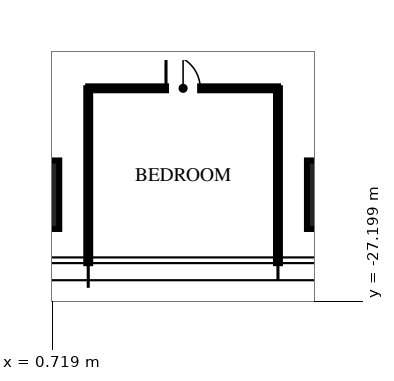
"""IFC4 building model, lengths in metres.
Left out: names, types, materials, properties, quantities, classifications, styles, units other than length and angle.
Written with IfcOpenShell. Run it as: python <this file> out.ifc"""

import sys

from ifc_helpers import new_model, si_unit, direction, frame, frame_2d, origin, origin_2d, place, context, subcontext, project, spatial, rectangle, extrude, element, fill, save


model = new_model("IFC4")
c1 = context("Model", 3, precision=1e-05, world=origin(), true_north=direction((0.0, 1.0)))
c2 = subcontext(c1, "Body", "Model", "MODEL_VIEW")
j1 = project(units=[si_unit("LENGTHUNIT", "METRE"), si_unit("PLANEANGLEUNIT", "RADIAN")], contexts=[c1])
p1 = place(None, origin())
s1 = spatial("IfcSite", under=j1, at=p1, CompositionType="ELEMENT")
p2 = place(p1, origin())
s2 = spatial("IfcBuilding", under=s1, at=p2, CompositionType="ELEMENT")
p3 = place(p2, frame((0.0, 0.0, 218.25)))
s3 = spatial("IfcBuildingStorey", under=s2, at=p3, CompositionType="ELEMENT", Elevation=218.25)
for number, where, z_axis, x_axis in (
    (1, (8.32, -24.4, 0.0), (0.0, 0.0, 1.0), (1.0, 0.0, 0.0)),
    (2, (0.0, -24.4, 0.0), (0.0, 0.0, 1.0), (1.0, 0.0, 0.0)),
):
    element("IfcColumn", number, at=place(p3, frame(where, z_axis=z_axis, x_axis=x_axis)), inside=s3, PredefinedType="COLUMN", context=c2, shape_type="SweptSolid", body=[
        extrude(rectangle(XDim=1.8, YDim=1.8, at=origin_2d()), origin(), (0.0, 0.0, 1.0), 3.75),
    ])
for number, where, z_axis, x_axis in (
    (3, (1.664, -21.6, 0.0), (0.0, 0.0, 1.0), (0.0, -1.0, 0.0)),
    (4, (6.656, -21.6, 0.0), (0.0, 0.0, 1.0), (0.0, -1.0, 0.0)),
):
    element("IfcWall", number, at=place(p3, frame(where, z_axis=z_axis, x_axis=x_axis)), inside=s3, PredefinedType="PARTITIONING", context=c2, shape_type="SweptSolid", body=[
        extrude(rectangle(XDim=4.6, YDim=0.1, at=frame_2d((2.3, 0.0))), origin(), (0.0, 0.0, 1.0), 2.91),
    ])
p4 = place(p3, frame((1.664, -21.6, 0.0), z_axis=(0.0, 0.0, 1.0), x_axis=(1.0, 0.0, 0.0)))
e5 = element("IfcWall", 5, at=p4, inside=s3, PredefinedType="PARTITIONING", context=c2, shape_type="SweptSolid", body=[
    extrude(rectangle(XDim=4.992, YDim=0.1, at=frame_2d((2.496, 0.0))), origin(), (0.0, 0.0, 1.0), 2.81),
])
p5 = place(p4, frame((2.046, 0.0, 0.0)))
e6 = element("IfcOpeningElement", 6, at=p5, cuts=e5, PredefinedType="OPENING", context=c2, shape_type="SweptSolid", body=[
    extrude(rectangle(XDim=0.9, YDim=2.1, at=frame_2d((0.45, 1.05))), frame((0.0, 0.06, 0.0), z_axis=(0.0, -1.0, 0.0), x_axis=(1.0, 0.0, 0.0)), (0.0, 0.0, 1.0), 0.12),
])
p6 = place(p5, origin())
e7 = element("IfcDoor", 7, at=p6, inside=s3, OperationType="SINGLE_SWING_LEFT", PredefinedType="DOOR", context=c2, shape_type="SweptSolid", body=[
    extrude(rectangle(XDim=0.9, YDim=2.1, at=frame_2d((0.45, 1.05))), frame((0.0, 0.025, 0.0), z_axis=(0.0, -1.0, 0.0), x_axis=(1.0, 0.0, 0.0)), (0.0, 0.0, 1.0), 0.05),
])
fill(e6, e7)
save(model, sys.argv[1])
